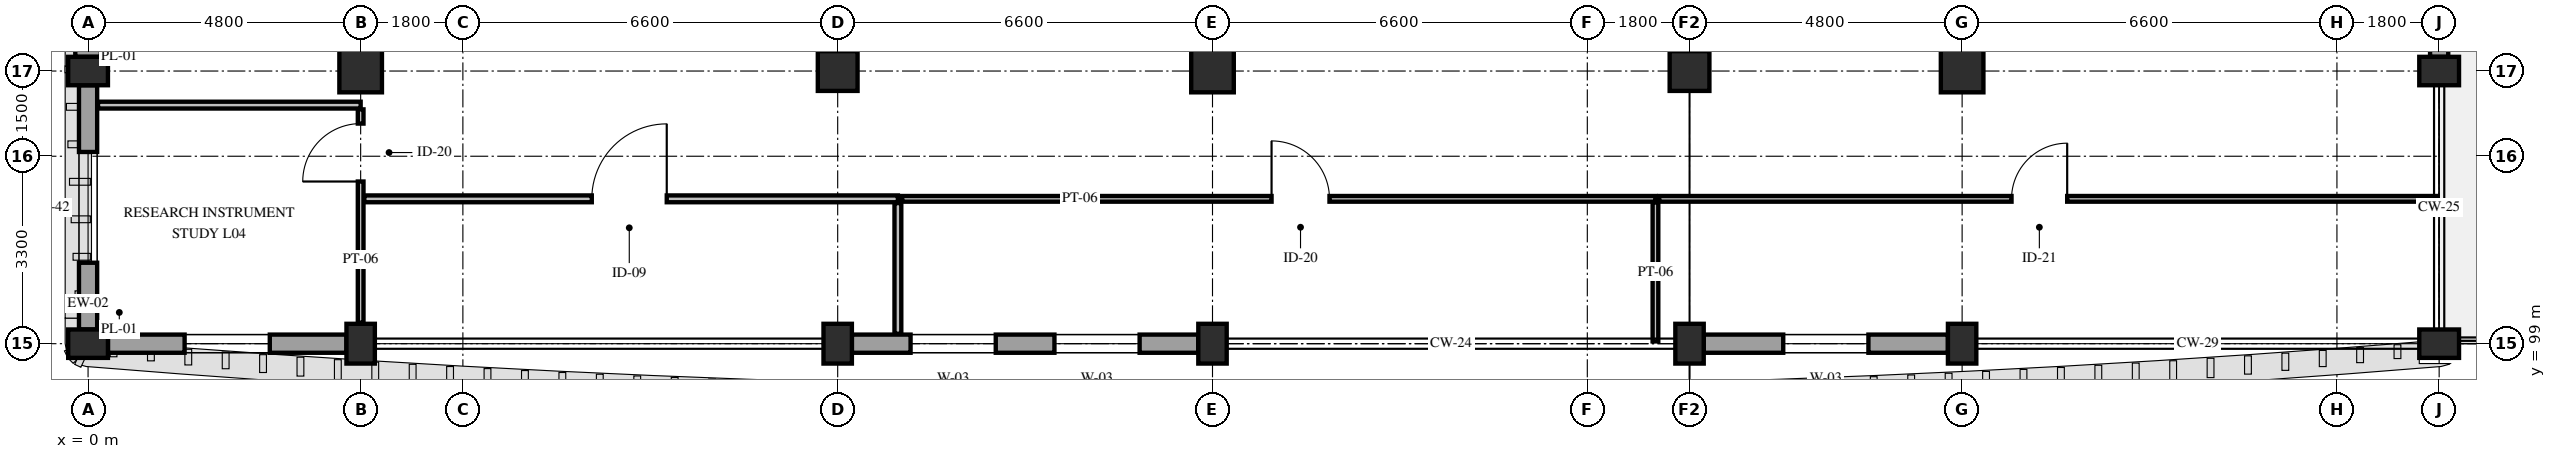
"""IFC4 building model, lengths in metres.
Left out: names, types, materials, properties, quantities, classifications, styles, units other than length and angle.
Written with IfcOpenShell. Run it as: python <this file> out.ifc"""

import sys

from ifc_helpers import new_model, si_unit, direction, frame, frame_2d, origin, origin_2d, place, context, subcontext, project, spatial, rectangle, extrude, element, fill, save


model = new_model("IFC4")
c1 = context("Model", 3, precision=1e-05, world=origin(), true_north=direction((0.0, 1.0)))
c2 = subcontext(c1, "Body", "Model", "MODEL_VIEW")
j1 = project(units=[si_unit("LENGTHUNIT", "METRE"), si_unit("PLANEANGLEUNIT", "RADIAN")], contexts=[c1])
p1 = place(None, origin())
s1 = spatial("IfcSite", under=j1, at=p1, CompositionType="ELEMENT")
p2 = place(p1, origin())
s2 = spatial("IfcBuilding", under=s1, at=p2, CompositionType="ELEMENT")
p3 = place(p2, frame((0.0, 0.0, 19.8)))
s3 = spatial("IfcBuildingStorey", under=s2, at=p3, CompositionType="ELEMENT", Elevation=19.8)
for number, where, z_axis, x_axis in (
    (1, (0.0, 99.0, 0.0), (0.0, 0.0, 1.0), (0.0, 1.0, 0.0)),
    (2, (0.0, 103.8, 0.0), (0.0, 0.0, 1.0), (0.0, 1.0, 0.0)),
    (3, (4.8, 99.0, 0.0), (0.0, 0.0, 1.0), (1.0, 0.0, 0.0)),
):
    element("IfcColumn", number, at=place(p3, frame(where, z_axis=z_axis, x_axis=x_axis)), inside=s3, PredefinedType="PILASTER", context=c2, shape_type="SweptSolid", body=[
        extrude(rectangle(XDim=0.5, YDim=0.7, at=origin_2d()), origin(), (0.0, 0.0, 1.0), 4.8),
    ])
p4 = place(p3, frame((4.8, 103.8, 0.0), z_axis=(0.0, 0.0, 1.0), x_axis=(1.0, 0.0, 0.0)))
e4 = element("IfcColumn", 4, at=p4, inside=s3, PredefinedType="COLUMN", context=c2, shape_type="SweptSolid", body=[
    extrude(rectangle(XDim=0.75, YDim=0.75, at=origin_2d()), origin(), (0.0, 0.0, 1.0), 4.8),
])
p5 = place(p3, frame((13.2, 99.0, 0.0), z_axis=(0.0, 0.0, 1.0), x_axis=(1.0, 0.0, 0.0)))
e5 = element("IfcColumn", 5, at=p5, inside=s3, PredefinedType="PILASTER", context=c2, shape_type="SweptSolid", body=[
    extrude(rectangle(XDim=0.5, YDim=0.7, at=origin_2d()), origin(), (0.0, 0.0, 1.0), 4.8),
])
p6 = place(p3, frame((13.2, 103.8, 0.0), z_axis=(0.0, 0.0, 1.0), x_axis=(1.0, 0.0, 0.0)))
e6 = element("IfcColumn", 6, at=p6, inside=s3, PredefinedType="COLUMN", context=c2, shape_type="SweptSolid", body=[
    extrude(rectangle(XDim=0.7, YDim=0.7, at=origin_2d()), origin(), (0.0, 0.0, 1.0), 4.8),
])
p7 = place(p3, frame((19.8, 99.0, 0.0), z_axis=(0.0, 0.0, 1.0), x_axis=(1.0, 0.0, 0.0)))
e7 = element("IfcColumn", 7, at=p7, inside=s3, PredefinedType="PILASTER", context=c2, shape_type="SweptSolid", body=[
    extrude(rectangle(XDim=0.5, YDim=0.7, at=origin_2d()), origin(), (0.0, 0.0, 1.0), 4.8),
])
p8 = place(p3, frame((19.8, 103.8, 0.0), z_axis=(0.0, 0.0, 1.0), x_axis=(1.0, 0.0, 0.0)))
e8 = element("IfcColumn", 8, at=p8, inside=s3, PredefinedType="COLUMN", context=c2, shape_type="SweptSolid", body=[
    extrude(rectangle(XDim=0.75, YDim=0.75, at=origin_2d()), origin(), (0.0, 0.0, 1.0), 4.8),
])
p9 = place(p3, frame((28.2, 99.0, 0.0), z_axis=(0.0, 0.0, 1.0), x_axis=(1.0, 0.0, 0.0)))
e9 = element("IfcColumn", 9, at=p9, inside=s3, PredefinedType="PILASTER", context=c2, shape_type="SweptSolid", body=[
    extrude(rectangle(XDim=0.5, YDim=0.7, at=origin_2d()), origin(), (0.0, 0.0, 1.0), 4.8),
])
p10 = place(p3, frame((28.2, 103.8, 0.0), z_axis=(0.0, 0.0, 1.0), x_axis=(1.0, 0.0, 0.0)))
e10 = element("IfcColumn", 10, at=p10, inside=s3, PredefinedType="COLUMN", context=c2, shape_type="SweptSolid", body=[
    extrude(rectangle(XDim=0.7, YDim=0.7, at=origin_2d()), origin(), (0.0, 0.0, 1.0), 4.8),
])
p11 = place(p3, frame((33.0, 99.0, 0.0), z_axis=(0.0, 0.0, 1.0), x_axis=(1.0, 0.0, 0.0)))
e11 = element("IfcColumn", 11, at=p11, inside=s3, PredefinedType="PILASTER", context=c2, shape_type="SweptSolid", body=[
    extrude(rectangle(XDim=0.5, YDim=0.7, at=origin_2d()), origin(), (0.0, 0.0, 1.0), 4.8),
])
p12 = place(p3, frame((33.0, 103.8, 0.0), z_axis=(0.0, 0.0, 1.0), x_axis=(1.0, 0.0, 0.0)))
e12 = element("IfcColumn", 12, at=p12, inside=s3, PredefinedType="COLUMN", context=c2, shape_type="SweptSolid", body=[
    extrude(rectangle(XDim=0.75, YDim=0.75, at=origin_2d()), origin(), (0.0, 0.0, 1.0), 4.8),
])
for number, where, z_axis, x_axis in (
    (13, (41.4, 99.0, 0.0), (0.0, 0.0, 1.0), (0.0, 1.0, 0.0)),
    (14, (41.4, 103.8, 0.0), (0.0, 0.0, 1.0), (0.0, 1.0, 0.0)),
):
    element("IfcColumn", number, at=place(p3, frame(where, z_axis=z_axis, x_axis=x_axis)), inside=s3, PredefinedType="PILASTER", context=c2, shape_type="SweptSolid", body=[
        extrude(rectangle(XDim=0.5, YDim=0.7, at=origin_2d()), origin(), (0.0, 0.0, 1.0), 4.8),
    ])
p13 = place(p3, frame((0.0, 99.25, 0.0), z_axis=(0.0, 0.0, 1.0), x_axis=(0.0, 1.0, 0.0)))
e15 = element("IfcWall", 15, at=p13, inside=s3, PredefinedType="STANDARD", context=c2, shape_type="SweptSolid", body=[
    extrude(rectangle(XDim=4.3, YDim=0.32, at=frame_2d((2.15, 0.0))), origin(), (0.0, 0.0, 1.0), 3.95),
])
p14 = place(p13, frame((1.175, 0.0, 0.85)))
e16 = element("IfcOpeningElement", 16, at=p14, cuts=e15, PredefinedType="OPENING", context=c2, shape_type="SweptSolid", body=[
    extrude(rectangle(XDim=1.95, YDim=2.24, at=frame_2d((0.975, 1.12))), frame((0.0, 0.175, 0.0), z_axis=(0.0, -1.0, 0.0), x_axis=(1.0, 0.0, 0.0)), (0.0, 0.0, 1.0), 0.35),
])
p15 = place(p3, frame((0.0, 104.05, 0.0), z_axis=(0.0, 0.0, 1.0), x_axis=(0.0, 1.0, 0.0)))
e17 = element("IfcWall", 17, at=p15, inside=s3, PredefinedType="SOLIDWALL", context=c2, shape_type="SweptSolid", body=[
    extrude(rectangle(XDim=6.1, YDim=0.45, at=frame_2d((3.05, 0.0))), origin(), (0.0, 0.0, 1.0), 3.95),
])
p16 = place(p3, frame((41.4, 110.15, 0.0), z_axis=(0.0, 0.0, 1.0), x_axis=(0.0, -1.0, 0.0)))
e18 = element("IfcWall", 18, at=p16, inside=s3, PredefinedType="STANDARD", context=c2, shape_type="SweptSolid", body=[
    extrude(rectangle(XDim=6.1, YDim=0.32, at=frame_2d((3.05, 0.0))), origin(), (0.0, 0.0, 1.0), 3.95),
])
p17 = place(p16, frame((1.55, 0.0, 0.85)))
e19 = element("IfcOpeningElement", 19, at=p17, cuts=e18, PredefinedType="OPENING", context=c2, shape_type="SweptSolid", body=[
    extrude(rectangle(XDim=3.0, YDim=2.08, at=frame_2d((1.5, 1.04))), frame((0.0, 0.175, 0.0), z_axis=(0.0, -1.0, 0.0), x_axis=(1.0, 0.0, 0.0)), (0.0, 0.0, 1.0), 0.35),
])
p18 = place(p3, frame((32.75, 99.0, 0.0), z_axis=(0.0, 0.0, 1.0), x_axis=(-1.0, 0.0, 0.0)))
e20 = element("IfcWall", 20, at=p18, inside=s3, PredefinedType="STANDARD", context=c2, shape_type="SweptSolid", body=[
    extrude(rectangle(XDim=4.3, YDim=0.32, at=frame_2d((2.15, 0.0))), origin(), (0.0, 0.0, 1.0), 3.95),
])
p19 = place(p18, frame((1.4, 0.0, 0.85)))
e21 = element("IfcOpeningElement", 21, at=p19, cuts=e20, PredefinedType="OPENING", context=c2, shape_type="SweptSolid", body=[
    extrude(rectangle(XDim=1.5, YDim=1.5, at=frame_2d((0.75, 0.75))), frame((0.0, 0.175, 0.0), z_axis=(0.0, -1.0, 0.0), x_axis=(1.0, 0.0, 0.0)), (0.0, 0.0, 1.0), 0.35),
])
p20 = place(p3, frame((19.55, 99.0, 0.0), z_axis=(0.0, 0.0, 1.0), x_axis=(-1.0, 0.0, 0.0)))
e22 = element("IfcWall", 22, at=p20, inside=s3, PredefinedType="STANDARD", context=c2, shape_type="SweptSolid", body=[
    extrude(rectangle(XDim=6.1, YDim=0.32, at=frame_2d((3.05, 0.0))), origin(), (0.0, 0.0, 1.0), 3.93),
])
p21 = place(p20, frame((1.033, 0.0, 0.85)))
e23 = element("IfcOpeningElement", 23, at=p21, cuts=e22, PredefinedType="OPENING", context=c2, shape_type="SweptSolid", body=[
    extrude(rectangle(XDim=1.5, YDim=1.5, at=frame_2d((0.75, 0.75))), frame((0.0, 0.175, 0.0), z_axis=(0.0, -1.0, 0.0), x_axis=(1.0, 0.0, 0.0)), (0.0, 0.0, 1.0), 0.35),
])
p22 = place(p20, frame((3.567, 0.0, 0.85)))
e24 = element("IfcOpeningElement", 24, at=p22, cuts=e22, PredefinedType="OPENING", context=c2, shape_type="SweptSolid", body=[
    extrude(rectangle(XDim=1.5, YDim=1.5, at=frame_2d((0.75, 0.75))), frame((0.0, 0.175, 0.0), z_axis=(0.0, -1.0, 0.0), x_axis=(1.0, 0.0, 0.0)), (0.0, 0.0, 1.0), 0.35),
])
p23 = place(p3, frame((4.55, 99.0, 0.0), z_axis=(0.0, 0.0, 1.0), x_axis=(-1.0, 0.0, 0.0)))
e25 = element("IfcWall", 25, at=p23, inside=s3, PredefinedType="STANDARD", context=c2, shape_type="SweptSolid", body=[
    extrude(rectangle(XDim=4.2, YDim=0.32, at=frame_2d((2.1, 0.0))), origin(), (0.0, 0.0, 1.0), 3.95),
])
p24 = place(p23, frame((1.35, 0.0, 0.85)))
e26 = element("IfcOpeningElement", 26, at=p24, cuts=e25, PredefinedType="OPENING", context=c2, shape_type="SweptSolid", body=[
    extrude(rectangle(XDim=1.5, YDim=1.5, at=frame_2d((0.75, 0.75))), frame((0.0, 0.175, 0.0), z_axis=(0.0, -1.0, 0.0), x_axis=(1.0, 0.0, 0.0)), (0.0, 0.0, 1.0), 0.35),
])
p25 = place(p3, frame((0.175, 103.2, 0.0), z_axis=(0.0, 0.0, 1.0), x_axis=(1.0, 0.0, 0.0)))
e27 = element("IfcWall", 27, at=p25, inside=s3, PredefinedType="PARTITIONING", context=c2, shape_type="SweptSolid", body=[
    extrude(rectangle(XDim=4.625, YDim=0.12, at=frame_2d((2.312, 0.0))), origin(), (0.0, 0.0, 1.0), 4.08),
])
p26 = place(p3, frame((4.8, 99.37, 0.0), z_axis=(0.0, 0.0, 1.0), x_axis=(0.0, 1.0, 0.0)))
e28 = element("IfcWall", 28, at=p26, inside=s3, PredefinedType="PARTITIONING", context=c2, shape_type="SweptSolid", body=[
    extrude(rectangle(XDim=3.755, YDim=0.1, at=frame_2d((1.877, 0.0))), origin(), (0.0, 0.0, 1.0), 4.13),
])
p27 = place(p26, frame((2.485, 0.0, 0.0)))
e29 = element("IfcOpeningElement", 29, at=p27, cuts=e28, PredefinedType="OPENING", context=c2, shape_type="SweptSolid", body=[
    extrude(rectangle(XDim=1.02, YDim=2.2, at=frame_2d((0.51, 1.1))), frame((0.0, 0.065, 0.0), z_axis=(0.0, -1.0, 0.0), x_axis=(1.0, 0.0, 0.0)), (0.0, 0.0, 1.0), 0.13),
])
p28 = place(p3, frame((4.865, 101.55, 0.0), z_axis=(0.0, 0.0, 1.0), x_axis=(1.0, 0.0, 0.0)))
e30 = element("IfcWall", 30, at=p28, inside=s3, PredefinedType="PARTITIONING", context=c2, shape_type="SweptSolid", body=[
    extrude(rectangle(XDim=9.395, YDim=0.12, at=frame_2d((4.698, 0.0))), origin(), (0.0, 0.0, 1.0), 4.13),
])
p29 = place(p28, frame((4.005, 0.0, 0.0)))
e31 = element("IfcOpeningElement", 31, at=p29, cuts=e30, PredefinedType="OPENING", context=c2, shape_type="SweptSolid", body=[
    extrude(rectangle(XDim=1.32, YDim=2.2, at=frame_2d((0.66, 1.1))), frame((0.0, 0.075, 0.0), z_axis=(0.0, -1.0, 0.0), x_axis=(1.0, 0.0, 0.0)), (0.0, 0.0, 1.0), 0.15),
])
p30 = place(p3, frame((14.26, 99.175, 0.0), z_axis=(0.0, 0.0, 1.0), x_axis=(0.0, 1.0, 0.0)))
e32 = element("IfcWall", 32, at=p30, inside=s3, PredefinedType="PARTITIONING", context=c2, shape_type="SweptSolid", body=[
    extrude(rectangle(XDim=2.3, YDim=0.12, at=frame_2d((1.15, 0.0))), origin(), (0.0, 0.0, 1.0), 3.93),
])
p31 = place(p3, frame((14.335, 101.55, 0.0), z_axis=(0.0, 0.0, 1.0), x_axis=(1.0, 0.0, 0.0)))
e33 = element("IfcWall", 33, at=p31, inside=s3, PredefinedType="PARTITIONING", context=c2, shape_type="SweptSolid", body=[
    extrude(rectangle(XDim=13.265, YDim=0.1, at=frame_2d((6.633, 0.0))), origin(), (0.0, 0.0, 1.0), 4.13),
])
p32 = place(p31, frame((6.505, 0.0, 0.0)))
e34 = element("IfcOpeningElement", 34, at=p32, cuts=e33, PredefinedType="OPENING", context=c2, shape_type="SweptSolid", body=[
    extrude(rectangle(XDim=1.02, YDim=2.2, at=frame_2d((0.51, 1.1))), frame((0.0, 0.065, 0.0), z_axis=(0.0, -1.0, 0.0), x_axis=(1.0, 0.0, 0.0)), (0.0, 0.0, 1.0), 0.13),
])
p33 = place(p3, frame((27.6, 99.04, 0.0), z_axis=(0.0, 0.0, 1.0), x_axis=(0.0, 1.0, 0.0)))
e35 = element("IfcWall", 35, at=p33, inside=s3, PredefinedType="PARTITIONING", context=c2, shape_type="SweptSolid", body=[
    extrude(rectangle(XDim=2.445, YDim=0.1, at=frame_2d((1.223, 0.0))), origin(), (0.0, 0.0, 1.0), 3.93),
])
p34 = place(p3, frame((27.665, 101.55, 0.0), z_axis=(0.0, 0.0, 1.0), x_axis=(1.0, 0.0, 0.0)))
e36 = element("IfcWall", 36, at=p34, inside=s3, PredefinedType="PARTITIONING", context=c2, shape_type="SweptSolid", body=[
    extrude(rectangle(XDim=13.695, YDim=0.1, at=frame_2d((6.848, 0.0))), origin(), (0.0, 0.0, 1.0), 4.08),
])
p35 = place(p34, frame((6.205, 0.0, 0.0)))
e37 = element("IfcOpeningElement", 37, at=p35, cuts=e36, PredefinedType="OPENING", context=c2, shape_type="SweptSolid", body=[
    extrude(rectangle(XDim=0.98, YDim=2.2, at=frame_2d((0.49, 1.1))), frame((0.0, 0.065, 0.0), z_axis=(0.0, -1.0, 0.0), x_axis=(1.0, 0.0, 0.0)), (0.0, 0.0, 1.0), 0.13),
])
p36 = place(p14, origin())
e38 = element("IfcWindow", 38, at=p36, inside=s3, PartitioningType="DOUBLE_PANEL_VERTICAL", PredefinedType="WINDOW", context=c2, shape_type="SweptSolid", body=[
    extrude(rectangle(XDim=1.95, YDim=2.24, at=frame_2d((0.975, 1.12))), frame((0.0, 0.03, 0.0), z_axis=(0.0, -1.0, 0.0), x_axis=(1.0, 0.0, 0.0)), (0.0, 0.0, 1.0), 0.06),
])
fill(e16, e38)
p37 = place(p19, origin())
e39 = element("IfcWindow", 39, at=p37, inside=s3, PartitioningType="SINGLE_PANEL", PredefinedType="WINDOW", context=c2, shape_type="SweptSolid", body=[
    extrude(rectangle(XDim=1.5, YDim=1.5, at=frame_2d((0.75, 0.75))), frame((0.0, 0.03, 0.0), z_axis=(0.0, -1.0, 0.0), x_axis=(1.0, 0.0, 0.0)), (0.0, 0.0, 1.0), 0.06),
])
fill(e21, e39)
p38 = place(p21, origin())
e40 = element("IfcWindow", 40, at=p38, inside=s3, PartitioningType="SINGLE_PANEL", PredefinedType="WINDOW", context=c2, shape_type="SweptSolid", body=[
    extrude(rectangle(XDim=1.5, YDim=1.5, at=frame_2d((0.75, 0.75))), frame((0.0, 0.03, 0.0), z_axis=(0.0, -1.0, 0.0), x_axis=(1.0, 0.0, 0.0)), (0.0, 0.0, 1.0), 0.06),
])
fill(e23, e40)
p39 = place(p22, origin())
e41 = element("IfcWindow", 41, at=p39, inside=s3, PartitioningType="SINGLE_PANEL", PredefinedType="WINDOW", context=c2, shape_type="SweptSolid", body=[
    extrude(rectangle(XDim=1.5, YDim=1.5, at=frame_2d((0.75, 0.75))), frame((0.0, 0.03, 0.0), z_axis=(0.0, -1.0, 0.0), x_axis=(1.0, 0.0, 0.0)), (0.0, 0.0, 1.0), 0.06),
])
fill(e24, e41)
p40 = place(p24, origin())
e42 = element("IfcWindow", 42, at=p40, inside=s3, PartitioningType="SINGLE_PANEL", PredefinedType="WINDOW", context=c2, shape_type="SweptSolid", body=[
    extrude(rectangle(XDim=1.5, YDim=1.5, at=frame_2d((0.75, 0.75))), frame((0.0, 0.03, 0.0), z_axis=(0.0, -1.0, 0.0), x_axis=(1.0, 0.0, 0.0)), (0.0, 0.0, 1.0), 0.06),
])
fill(e26, e42)
p41 = place(p27, origin())
e43 = element("IfcDoor", 43, at=p41, inside=s3, OperationType="SINGLE_SWING_LEFT", PredefinedType="DOOR", context=c2, shape_type="SweptSolid", body=[
    extrude(rectangle(XDim=1.02, YDim=2.2, at=frame_2d((0.51, 1.1))), frame((0.0, 0.025, 0.0), z_axis=(0.0, -1.0, 0.0), x_axis=(1.0, 0.0, 0.0)), (0.0, 0.0, 1.0), 0.05),
])
fill(e29, e43)
p42 = place(p29, origin())
e44 = element("IfcDoor", 44, at=p42, inside=s3, OperationType="SINGLE_SWING_RIGHT", PredefinedType="DOOR", context=c2, shape_type="SweptSolid", body=[
    extrude(rectangle(XDim=1.32, YDim=2.2, at=frame_2d((0.66, 1.1))), frame((0.0, 0.025, 0.0), z_axis=(0.0, -1.0, 0.0), x_axis=(1.0, 0.0, 0.0)), (0.0, 0.0, 1.0), 0.05),
])
fill(e31, e44)
p43 = place(p32, origin())
e45 = element("IfcDoor", 45, at=p43, inside=s3, OperationType="SINGLE_SWING_LEFT", PredefinedType="DOOR", context=c2, shape_type="SweptSolid", body=[
    extrude(rectangle(XDim=1.02, YDim=2.2, at=frame_2d((0.51, 1.1))), frame((0.0, 0.025, 0.0), z_axis=(0.0, -1.0, 0.0), x_axis=(1.0, 0.0, 0.0)), (0.0, 0.0, 1.0), 0.05),
])
fill(e34, e45)
p44 = place(p35, origin())
e46 = element("IfcDoor", 46, at=p44, inside=s3, OperationType="SINGLE_SWING_RIGHT", PredefinedType="DOOR", context=c2, shape_type="SweptSolid", body=[
    extrude(rectangle(XDim=0.98, YDim=2.2, at=frame_2d((0.49, 1.1))), frame((0.0, 0.025, 0.0), z_axis=(0.0, -1.0, 0.0), x_axis=(1.0, 0.0, 0.0)), (0.0, 0.0, 1.0), 0.05),
])
fill(e37, e46)
save(model, sys.argv[1])
